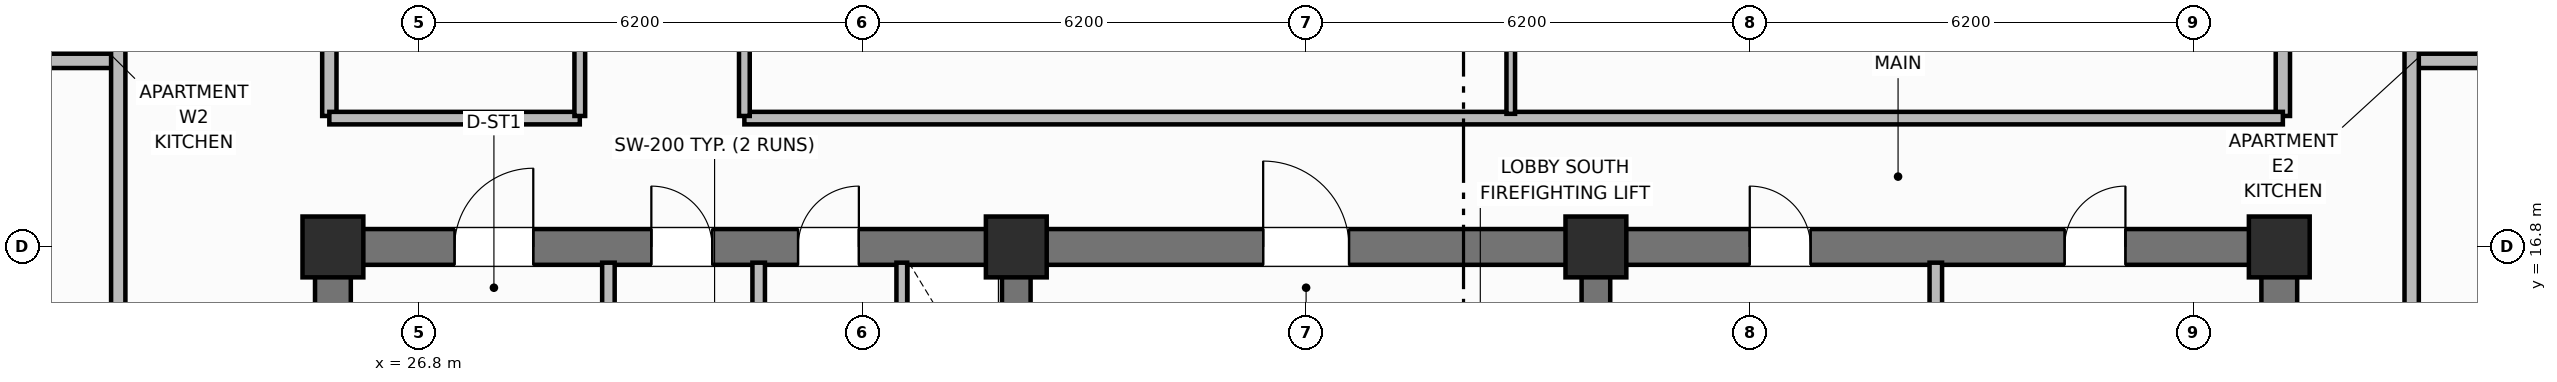
"""IFC4 building model, lengths in metres.
Left out: names, types, materials, properties, quantities, classifications, styles, units other than length and angle.
Written with IfcOpenShell. Run it as: python <this file> out.ifc"""

import sys

from ifc_helpers import new_model, si_unit, direction, frame, frame_2d, origin, origin_2d, place, context, subcontext, project, spatial, rectangle, extrude, element, fill, save


model = new_model("IFC4")
c1 = context("Model", 3, precision=1e-05, world=origin(), true_north=direction((0.0, 1.0)))
c2 = subcontext(c1, "Body", "Model", "MODEL_VIEW")
j1 = project(units=[si_unit("LENGTHUNIT", "METRE"), si_unit("PLANEANGLEUNIT", "RADIAN")], contexts=[c1])
p1 = place(None, origin())
s1 = spatial("IfcSite", under=j1, at=p1, CompositionType="ELEMENT")
p2 = place(p1, origin())
s2 = spatial("IfcBuilding", under=s1, at=p2, CompositionType="ELEMENT")
p3 = place(p2, frame((0.0, 0.0, 218.4)))
s3 = spatial("IfcBuildingStorey", under=s2, at=p3, CompositionType="ELEMENT", Elevation=218.4)
for number, where, z_axis, x_axis in (
    (1, (25.6, 10.85, 0.0), (0.0, 0.0, 1.0), (0.0, 1.0, 0.0)),
    (2, (52.8, 10.85, 0.0), (0.0, 0.0, 1.0), (0.0, 1.0, 0.0)),
):
    element("IfcWall", number, at=place(p3, frame(where, z_axis=z_axis, x_axis=x_axis)), inside=s3, PredefinedType="SHEAR", context=c2, shape_type="SweptSolid", body=[
        extrude(rectangle(XDim=5.7, YDim=0.5, at=frame_2d((2.85, 0.0))), origin(), (0.0, 0.0, 1.0), 3.7),
    ])
p4 = place(p3, frame((25.6, 16.8, 0.0), z_axis=(0.0, 0.0, 1.0), x_axis=(1.0, 0.0, 0.0)))
e3 = element("IfcWall", 3, at=p4, inside=s3, PredefinedType="SHEAR", context=c2, shape_type="SweptSolid", body=[
    extrude(rectangle(XDim=27.2, YDim=0.5, at=frame_2d((13.6, 0.0))), origin(), (0.0, 0.0, 1.0), 3.7),
])
p5 = place(p4, frame((1.7, 0.0, 0.0)))
e4 = element("IfcOpeningElement", 4, at=p5, cuts=e3, PredefinedType="OPENING", context=c2, shape_type="SweptSolid", body=[
    extrude(rectangle(XDim=1.1, YDim=2.15, at=frame_2d((0.55, 1.075))), frame((0.0, 0.26, 0.0), z_axis=(0.0, -1.0, 0.0), x_axis=(1.0, 0.0, 0.0)), (0.0, 0.0, 1.0), 0.52),
])
p6 = place(p4, frame((4.45, 0.0, 0.0)))
e5 = element("IfcOpeningElement", 5, at=p6, cuts=e3, PredefinedType="OPENING", context=c2, shape_type="SweptSolid", body=[
    extrude(rectangle(XDim=0.85, YDim=2.1, at=frame_2d((0.425, 1.05))), frame((0.0, 0.26, 0.0), z_axis=(0.0, -1.0, 0.0), x_axis=(1.0, 0.0, 0.0)), (0.0, 0.0, 1.0), 0.52),
])
p7 = place(p4, frame((6.5, 0.0, 0.0)))
e6 = element("IfcOpeningElement", 6, at=p7, cuts=e3, PredefinedType="OPENING", context=c2, shape_type="SweptSolid", body=[
    extrude(rectangle(XDim=0.85, YDim=2.1, at=frame_2d((0.425, 1.05))), frame((0.0, 0.26, 0.0), z_axis=(0.0, -1.0, 0.0), x_axis=(1.0, 0.0, 0.0)), (0.0, 0.0, 1.0), 0.52),
])
p8 = place(p4, frame((13.0, 0.0, 0.0)))
e7 = element("IfcOpeningElement", 7, at=p8, cuts=e3, PredefinedType="OPENING", context=c2, shape_type="SweptSolid", body=[
    extrude(rectangle(XDim=1.2, YDim=2.15, at=frame_2d((0.6, 1.075))), frame((0.0, 0.26, 0.0), z_axis=(0.0, -1.0, 0.0), x_axis=(1.0, 0.0, 0.0)), (0.0, 0.0, 1.0), 0.52),
])
p9 = place(p4, frame((19.8, 0.0, 0.0)))
e8 = element("IfcOpeningElement", 8, at=p9, cuts=e3, PredefinedType="OPENING", context=c2, shape_type="SweptSolid", body=[
    extrude(rectangle(XDim=0.85, YDim=2.1, at=frame_2d((0.425, 1.05))), frame((0.0, 0.26, 0.0), z_axis=(0.0, -1.0, 0.0), x_axis=(1.0, 0.0, 0.0)), (0.0, 0.0, 1.0), 0.52),
])
p10 = place(p4, frame((24.2, 0.0, 0.0)))
e9 = element("IfcOpeningElement", 9, at=p10, cuts=e3, PredefinedType="OPENING", context=c2, shape_type="SweptSolid", body=[
    extrude(rectangle(XDim=0.85, YDim=2.1, at=frame_2d((0.425, 1.05))), frame((0.0, 0.26, 0.0), z_axis=(0.0, -1.0, 0.0), x_axis=(1.0, 0.0, 0.0)), (0.0, 0.0, 1.0), 0.52),
])
for number, where, z_axis, x_axis in (
    (10, (35.15, 10.85, 0.0), (0.0, 0.0, 1.0), (0.0, 1.0, 0.0)),
    (11, (43.25, 10.85, 0.0), (0.0, 0.0, 1.0), (0.0, 1.0, 0.0)),
):
    element("IfcWall", number, at=place(p3, frame(where, z_axis=z_axis, x_axis=x_axis)), inside=s3, PredefinedType="SHEAR", context=c2, shape_type="SweptSolid", body=[
        extrude(rectangle(XDim=5.7, YDim=0.4, at=frame_2d((2.85, 0.0))), origin(), (0.0, 0.0, 1.0), 3.7),
    ])
for number, where, z_axis, x_axis in (
    (12, (25.6, 16.8, 0.0), (0.0, 0.0, 1.0), (1.0, 0.0, 0.0)),
    (13, (35.15, 16.8, 0.0), (0.0, 0.0, 1.0), (1.0, 0.0, 0.0)),
    (14, (43.25, 16.8, 0.0), (0.0, 0.0, 1.0), (1.0, 0.0, 0.0)),
    (15, (52.8, 16.8, 0.0), (0.0, 0.0, 1.0), (1.0, 0.0, 0.0)),
):
    element("IfcColumn", number, at=place(p3, frame(where, z_axis=z_axis, x_axis=x_axis)), inside=s3, PredefinedType="COLUMN", context=c2, shape_type="SweptSolid", body=[
        extrude(rectangle(XDim=0.85, YDim=0.85, at=origin_2d()), origin(), (0.0, 0.0, 1.0), 3.7),
    ])
for number, where, z_axis, x_axis in (
    (16, (29.45, 14.5, 0.0), (0.0, 0.0, 1.0), (0.0, 1.0, 0.0)),
    (17, (31.55, 14.5, 0.0), (0.0, 0.0, 1.0), (0.0, 1.0, 0.0)),
):
    element("IfcWall", number, at=place(p3, frame(where, z_axis=z_axis, x_axis=x_axis)), inside=s3, PredefinedType="PARTITIONING", context=c2, shape_type="SweptSolid", body=[
        extrude(rectangle(XDim=2.08, YDim=0.175, at=frame_2d((1.04, 0.0))), origin(), (0.0, 0.0, 1.0), 2.55),
    ])
p11 = place(p3, frame((33.55, 14.5, 0.0), z_axis=(0.0, 0.0, 1.0), x_axis=(0.0, 1.0, 0.0)))
e18 = element("IfcWall", 18, at=p11, inside=s3, PredefinedType="PARTITIONING", context=c2, shape_type="SweptSolid", body=[
    extrude(rectangle(XDim=2.08, YDim=0.15, at=frame_2d((1.04, 0.0))), origin(), (0.0, 0.0, 1.0), 2.55),
])
p12 = place(p11, frame((0.55, 0.0, 0.0)))
e19 = element("IfcOpeningElement", 19, at=p12, cuts=e18, PredefinedType="OPENING", context=c2, shape_type="SweptSolid", body=[
    extrude(rectangle(XDim=0.85, YDim=2.05, at=frame_2d((0.425, 1.025))), frame((0.0, 0.085, 0.0), z_axis=(0.0, -1.0, 0.0), x_axis=(1.0, 0.0, 0.0)), (0.0, 0.0, 1.0), 0.17),
])
p13 = place(p3, frame((48.0, 10.95, 0.0), z_axis=(0.0, 0.0, 1.0), x_axis=(0.0, 1.0, 0.0)))
e20 = element("IfcWall", 20, at=p13, inside=s3, PredefinedType="PARTITIONING", context=c2, shape_type="SweptSolid", body=[
    extrude(rectangle(XDim=5.63, YDim=0.175, at=frame_2d((2.815, 0.0))), origin(), (0.0, 0.0, 1.0), 2.55),
])
for number, where, z_axis, x_axis in (
    (21, (25.55, 18.63, 0.0), (0.0, 0.0, 1.0), (0.0, 1.0, 0.0)),
    (22, (52.85, 18.63, 0.0), (0.0, 0.0, 1.0), (0.0, 1.0, 0.0)),
):
    element("IfcWall", number, at=place(p3, frame(where, z_axis=z_axis, x_axis=x_axis)), inside=s3, PredefinedType="PARTITIONING", context=c2, shape_type="SweptSolid", body=[
        extrude(rectangle(XDim=19.14, YDim=0.2, at=frame_2d((9.57, 0.0))), origin(), (0.0, 0.0, 1.0), 2.55),
    ])
p14 = place(p3, frame((25.55, 18.6, 0.0), z_axis=(0.0, 0.0, 1.0), x_axis=(1.0, 0.0, 0.0)))
e23 = element("IfcWall", 23, at=p14, inside=s3, PredefinedType="PARTITIONING", context=c2, shape_type="SweptSolid", body=[
    extrude(rectangle(XDim=3.5, YDim=0.175, at=frame_2d((1.75, 0.0))), origin(), (0.0, 0.0, 1.0), 2.55),
])
p15 = place(p3, frame((31.35, 18.6, 0.0), z_axis=(0.0, 0.0, 1.0), x_axis=(1.0, 0.0, 0.0)))
e24 = element("IfcWall", 24, at=p15, inside=s3, PredefinedType="PARTITIONING", context=c2, shape_type="SweptSolid", body=[
    extrude(rectangle(XDim=21.5, YDim=0.175, at=frame_2d((10.75, 0.0))), origin(), (0.0, 0.0, 1.0), 2.55),
])
p16 = place(p3, frame((42.06, 18.66, 0.0), z_axis=(0.0, 0.0, 1.0), x_axis=(0.0, 1.0, 0.0)))
e25 = element("IfcWall", 25, at=p16, inside=s3, PredefinedType="PARTITIONING", context=c2, shape_type="SweptSolid", body=[
    extrude(rectangle(XDim=10.648, YDim=0.12, at=frame_2d((5.324, 0.0))), origin(), (0.0, 0.0, 1.0), 2.55),
])
p17 = place(p16, frame((2.0, 0.0, 0.0)))
e26 = element("IfcOpeningElement", 26, at=p17, cuts=e25, PredefinedType="OPENING", context=c2, shape_type="SweptSolid", body=[
    extrude(rectangle(XDim=0.9, YDim=2.1, at=frame_2d((0.45, 1.05))), frame((0.0, 0.07, 0.0), z_axis=(0.0, -1.0, 0.0), x_axis=(1.0, 0.0, 0.0)), (0.0, 0.0, 1.0), 0.14),
])
p18 = place(p3, frame((29.05, 18.63, 0.0), z_axis=(0.0, 0.0, 1.0), x_axis=(0.0, 1.0, 0.0)))
e27 = element("IfcWall", 27, at=p18, inside=s3, PredefinedType="PARTITIONING", context=c2, shape_type="SweptSolid", body=[
    extrude(rectangle(XDim=19.14, YDim=0.15, at=frame_2d((9.57, 0.0))), origin(), (0.0, 0.0, 1.0), 2.55),
])
p19 = place(p18, frame((5.5, 0.0, 0.0)))
e28 = element("IfcOpeningElement", 28, at=p19, cuts=e27, PredefinedType="OPENING", context=c2, shape_type="SweptSolid", body=[
    extrude(rectangle(XDim=1.0, YDim=2.15, at=frame_2d((0.5, 1.075))), frame((0.0, 0.085, 0.0), z_axis=(0.0, -1.0, 0.0), x_axis=(1.0, 0.0, 0.0)), (0.0, 0.0, 1.0), 0.17),
])
p20 = place(p3, frame((31.35, 18.63, 0.0), z_axis=(0.0, 0.0, 1.0), x_axis=(0.0, 1.0, 0.0)))
e29 = element("IfcWall", 29, at=p20, inside=s3, PredefinedType="PARTITIONING", context=c2, shape_type="SweptSolid", body=[
    extrude(rectangle(XDim=19.14, YDim=0.15, at=frame_2d((9.57, 0.0))), origin(), (0.0, 0.0, 1.0), 2.55),
])
p21 = place(p20, frame((2.2, 0.0, 0.0)))
e30 = element("IfcOpeningElement", 30, at=p21, cuts=e29, PredefinedType="OPENING", context=c2, shape_type="SweptSolid", body=[
    extrude(rectangle(XDim=1.0, YDim=2.15, at=frame_2d((0.5, 1.075))), frame((0.0, 0.085, 0.0), z_axis=(0.0, -1.0, 0.0), x_axis=(1.0, 0.0, 0.0)), (0.0, 0.0, 1.0), 0.17),
])
p22 = place(p20, frame((12.719, 0.0, 0.0)))
e31 = element("IfcOpeningElement", 31, at=p22, cuts=e29, PredefinedType="OPENING", context=c2, shape_type="SweptSolid", body=[
    extrude(rectangle(XDim=1.0, YDim=2.15, at=frame_2d((0.5, 1.075))), frame((0.0, 0.085, 0.0), z_axis=(0.0, -1.0, 0.0), x_axis=(1.0, 0.0, 0.0)), (0.0, 0.0, 1.0), 0.17),
])
p23 = place(p3, frame((16.57, 19.4, 0.0), z_axis=(0.0, 0.0, 1.0), x_axis=(1.0, 0.0, 0.0)))
e32 = element("IfcWall", 32, at=p23, inside=s3, PredefinedType="PARTITIONING", context=c2, shape_type="SweptSolid", body=[
    extrude(rectangle(XDim=6.03, YDim=0.2, at=frame_2d((3.015, 0.0))), origin(), (0.0, 0.0, 1.0), 2.55),
])
p24 = place(p3, frame((22.6, 10.6, 0.0), z_axis=(0.0, 0.0, 1.0), x_axis=(0.0, 1.0, 0.0)))
e33 = element("IfcWall", 33, at=p24, inside=s3, PredefinedType="PARTITIONING", context=c2, shape_type="SweptSolid", body=[
    extrude(rectangle(XDim=35.2, YDim=0.2, at=frame_2d((17.6, 0.0))), origin(), (0.0, 0.0, 1.0), 2.55),
])
p25 = place(p24, frame((2.65, 0.0, 0.0)))
e34 = element("IfcOpeningElement", 34, at=p25, cuts=e33, PredefinedType="OPENING", context=c2, shape_type="SweptSolid", body=[
    extrude(rectangle(XDim=1.0, YDim=2.15, at=frame_2d((0.5, 1.075))), frame((0.0, 0.11, 0.0), z_axis=(0.0, -1.0, 0.0), x_axis=(1.0, 0.0, 0.0)), (0.0, 0.0, 1.0), 0.22),
])
p26 = place(p24, frame((10.81, 0.0, 0.0)))
e35 = element("IfcOpeningElement", 35, at=p26, cuts=e33, PredefinedType="OPENING", context=c2, shape_type="SweptSolid", body=[
    extrude(rectangle(XDim=1.0, YDim=2.15, at=frame_2d((0.5, 1.075))), frame((0.0, 0.11, 0.0), z_axis=(0.0, -1.0, 0.0), x_axis=(1.0, 0.0, 0.0)), (0.0, 0.0, 1.0), 0.22),
])
p27 = place(p24, frame((19.54, 0.0, 0.0)))
e36 = element("IfcOpeningElement", 36, at=p27, cuts=e33, PredefinedType="OPENING", context=c2, shape_type="SweptSolid", body=[
    extrude(rectangle(XDim=1.0, YDim=2.15, at=frame_2d((0.5, 1.075))), frame((0.0, 0.11, 0.0), z_axis=(0.0, -1.0, 0.0), x_axis=(1.0, 0.0, 0.0)), (0.0, 0.0, 1.0), 0.22),
])
p28 = place(p24, frame((26.95, 0.0, 0.0)))
e37 = element("IfcOpeningElement", 37, at=p28, cuts=e33, PredefinedType="OPENING", context=c2, shape_type="SweptSolid", body=[
    extrude(rectangle(XDim=1.0, YDim=2.15, at=frame_2d((0.5, 1.075))), frame((0.0, 0.11, 0.0), z_axis=(0.0, -1.0, 0.0), x_axis=(1.0, 0.0, 0.0)), (0.0, 0.0, 1.0), 0.22),
])
p29 = place(p3, frame((54.65, 19.4, 0.0), z_axis=(0.0, 0.0, 1.0), x_axis=(1.0, 0.0, 0.0)))
e38 = element("IfcWall", 38, at=p29, inside=s3, PredefinedType="PARTITIONING", context=c2, shape_type="SweptSolid", body=[
    extrude(rectangle(XDim=7.18, YDim=0.2, at=frame_2d((3.59, 0.0))), origin(), (0.0, 0.0, 1.0), 2.55),
])
p30 = place(p3, frame((54.65, 10.6, 0.0), z_axis=(0.0, 0.0, 1.0), x_axis=(0.0, 1.0, 0.0)))
e39 = element("IfcWall", 39, at=p30, inside=s3, PredefinedType="PARTITIONING", context=c2, shape_type="SweptSolid", body=[
    extrude(rectangle(XDim=35.2, YDim=0.2, at=frame_2d((17.6, 0.0))), origin(), (0.0, 0.0, 1.0), 2.55),
])
p31 = place(p30, frame((2.65, 0.0, 0.0)))
e40 = element("IfcOpeningElement", 40, at=p31, cuts=e39, PredefinedType="OPENING", context=c2, shape_type="SweptSolid", body=[
    extrude(rectangle(XDim=1.0, YDim=2.15, at=frame_2d((0.5, 1.075))), frame((0.0, 0.11, 0.0), z_axis=(0.0, -1.0, 0.0), x_axis=(1.0, 0.0, 0.0)), (0.0, 0.0, 1.0), 0.22),
])
p32 = place(p30, frame((10.81, 0.0, 0.0)))
e41 = element("IfcOpeningElement", 41, at=p32, cuts=e39, PredefinedType="OPENING", context=c2, shape_type="SweptSolid", body=[
    extrude(rectangle(XDim=1.0, YDim=2.15, at=frame_2d((0.5, 1.075))), frame((0.0, 0.11, 0.0), z_axis=(0.0, -1.0, 0.0), x_axis=(1.0, 0.0, 0.0)), (0.0, 0.0, 1.0), 0.22),
])
p33 = place(p30, frame((19.54, 0.0, 0.0)))
e42 = element("IfcOpeningElement", 42, at=p33, cuts=e39, PredefinedType="OPENING", context=c2, shape_type="SweptSolid", body=[
    extrude(rectangle(XDim=1.0, YDim=2.15, at=frame_2d((0.5, 1.075))), frame((0.0, 0.11, 0.0), z_axis=(0.0, -1.0, 0.0), x_axis=(1.0, 0.0, 0.0)), (0.0, 0.0, 1.0), 0.22),
])
p34 = place(p30, frame((26.95, 0.0, 0.0)))
e43 = element("IfcOpeningElement", 43, at=p34, cuts=e39, PredefinedType="OPENING", context=c2, shape_type="SweptSolid", body=[
    extrude(rectangle(XDim=1.0, YDim=2.15, at=frame_2d((0.5, 1.075))), frame((0.0, 0.11, 0.0), z_axis=(0.0, -1.0, 0.0), x_axis=(1.0, 0.0, 0.0)), (0.0, 0.0, 1.0), 0.22),
])
p35 = place(p5, origin())
e44 = element("IfcDoor", 44, at=p35, inside=s3, OperationType="SINGLE_SWING_RIGHT", PredefinedType="DOOR", context=c2, shape_type="SweptSolid", body=[
    extrude(rectangle(XDim=1.1, YDim=2.15, at=frame_2d((0.55, 1.075))), frame((0.0, 0.025, 0.0), z_axis=(0.0, -1.0, 0.0), x_axis=(1.0, 0.0, 0.0)), (0.0, 0.0, 1.0), 0.05),
])
fill(e4, e44)
p36 = place(p6, origin())
e45 = element("IfcDoor", 45, at=p36, inside=s3, OperationType="SINGLE_SWING_LEFT", PredefinedType="DOOR", context=c2, shape_type="SweptSolid", body=[
    extrude(rectangle(XDim=0.85, YDim=2.1, at=frame_2d((0.425, 1.05))), frame((0.0, 0.025, 0.0), z_axis=(0.0, -1.0, 0.0), x_axis=(1.0, 0.0, 0.0)), (0.0, 0.0, 1.0), 0.05),
])
fill(e5, e45)
p37 = place(p7, origin())
e46 = element("IfcDoor", 46, at=p37, inside=s3, OperationType="SINGLE_SWING_RIGHT", PredefinedType="DOOR", context=c2, shape_type="SweptSolid", body=[
    extrude(rectangle(XDim=0.85, YDim=2.1, at=frame_2d((0.425, 1.05))), frame((0.0, 0.025, 0.0), z_axis=(0.0, -1.0, 0.0), x_axis=(1.0, 0.0, 0.0)), (0.0, 0.0, 1.0), 0.05),
])
fill(e6, e46)
p38 = place(p8, origin())
e47 = element("IfcDoor", 47, at=p38, inside=s3, OperationType="SINGLE_SWING_LEFT", PredefinedType="DOOR", context=c2, shape_type="SweptSolid", body=[
    extrude(rectangle(XDim=1.2, YDim=2.15, at=frame_2d((0.6, 1.075))), frame((0.0, 0.025, 0.0), z_axis=(0.0, -1.0, 0.0), x_axis=(1.0, 0.0, 0.0)), (0.0, 0.0, 1.0), 0.05),
])
fill(e7, e47)
p39 = place(p9, origin())
e48 = element("IfcDoor", 48, at=p39, inside=s3, OperationType="SINGLE_SWING_LEFT", PredefinedType="DOOR", context=c2, shape_type="SweptSolid", body=[
    extrude(rectangle(XDim=0.85, YDim=2.1, at=frame_2d((0.425, 1.05))), frame((0.0, 0.025, 0.0), z_axis=(0.0, -1.0, 0.0), x_axis=(1.0, 0.0, 0.0)), (0.0, 0.0, 1.0), 0.05),
])
fill(e8, e48)
p40 = place(p10, origin())
e49 = element("IfcDoor", 49, at=p40, inside=s3, OperationType="SINGLE_SWING_RIGHT", PredefinedType="DOOR", context=c2, shape_type="SweptSolid", body=[
    extrude(rectangle(XDim=0.85, YDim=2.1, at=frame_2d((0.425, 1.05))), frame((0.0, 0.025, 0.0), z_axis=(0.0, -1.0, 0.0), x_axis=(1.0, 0.0, 0.0)), (0.0, 0.0, 1.0), 0.05),
])
fill(e9, e49)
save(model, sys.argv[1])
